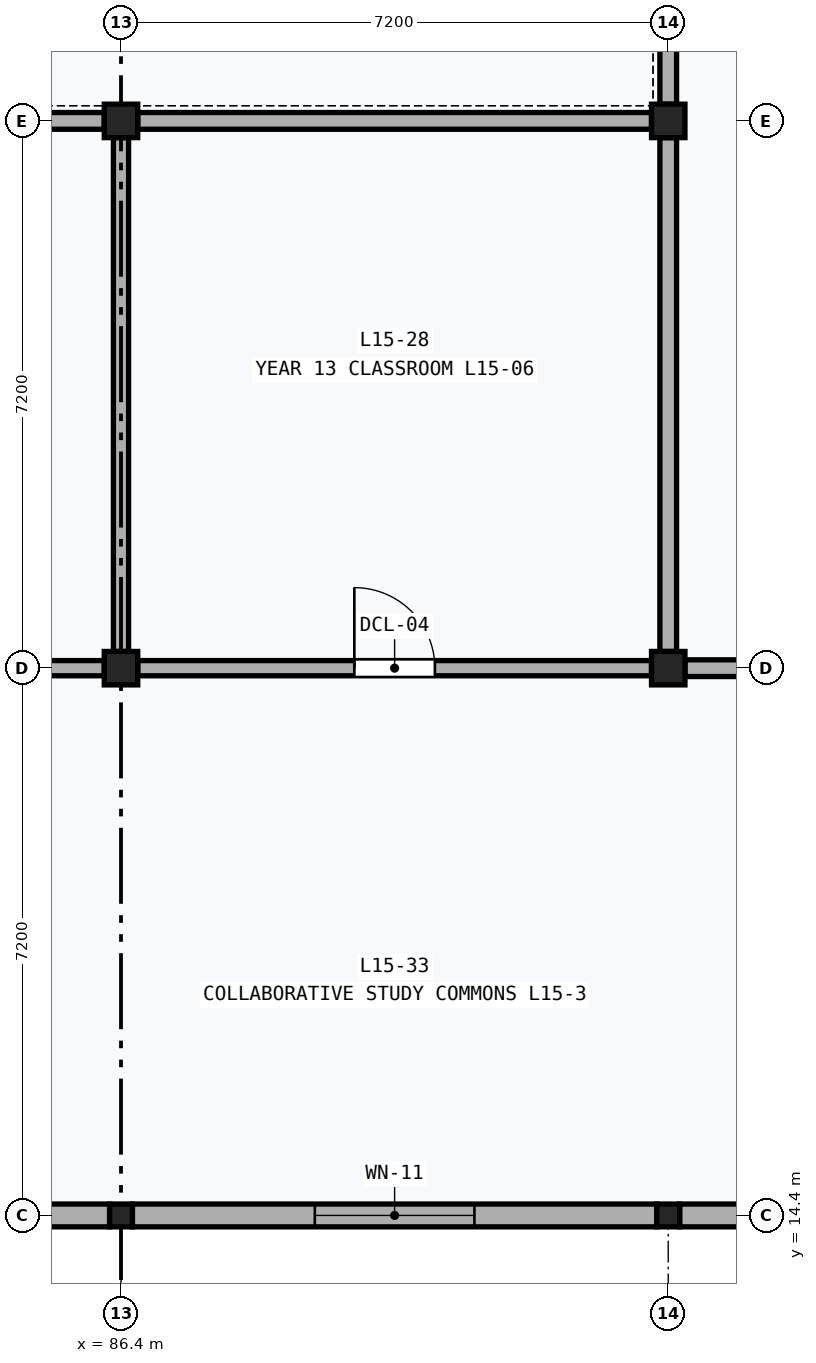
"""IFC4 building model, lengths in metres.
Left out: names, types, materials, properties, quantities, classifications, styles, units other than length and angle.
Written with IfcOpenShell. Run it as: python <this file> out.ifc"""

import sys

from ifc_helpers import new_model, si_unit, direction, frame, frame_2d, origin, origin_2d, place, context, subcontext, project, spatial, rectangle, extrude, element, fill, save


model = new_model("IFC4")
c1 = context("Model", 3, precision=1e-05, world=origin(), true_north=direction((0.0, 1.0)))
c2 = subcontext(c1, "Body", "Model", "MODEL_VIEW")
j1 = project(units=[si_unit("LENGTHUNIT", "METRE"), si_unit("PLANEANGLEUNIT", "RADIAN")], contexts=[c1])
p1 = place(None, origin())
s1 = spatial("IfcSite", under=j1, at=p1, CompositionType="ELEMENT")
p2 = place(p1, origin())
s2 = spatial("IfcBuilding", under=s1, at=p2, CompositionType="ELEMENT")
p3 = place(p2, frame((0.0, 0.0, 63.0)))
s3 = spatial("IfcBuildingStorey", under=s2, at=p3, CompositionType="ELEMENT", Elevation=63.0)
p4 = place(p3, frame((86.4, 14.4, 0.0), z_axis=(0.0, 0.0, 1.0), x_axis=(1.0, 0.0, 0.0)))
e1 = element("IfcColumn", 1, at=p4, inside=s3, PredefinedType="COLUMN", context=c2, shape_type="SweptSolid", body=[
    extrude(rectangle(XDim=0.3, YDim=0.3, at=origin_2d()), origin(), (0.0, 0.0, 1.0), 4.2),
])
for number, where, z_axis, x_axis in (
    (2, (86.4, 21.6, 0.0), (0.0, 0.0, 1.0), (1.0, 0.0, 0.0)),
    (3, (86.4, 28.8, 0.0), (0.0, 0.0, 1.0), (1.0, 0.0, 0.0)),
):
    element("IfcColumn", number, at=place(p3, frame(where, z_axis=z_axis, x_axis=x_axis)), inside=s3, PredefinedType="COLUMN", context=c2, shape_type="SweptSolid", body=[
        extrude(rectangle(XDim=0.44, YDim=0.44, at=origin_2d()), origin(), (0.0, 0.0, 1.0), 4.2),
    ])
p5 = place(p3, frame((93.6, 14.4, 0.0), z_axis=(0.0, 0.0, 1.0), x_axis=(1.0, 0.0, 0.0)))
e4 = element("IfcColumn", 4, at=p5, inside=s3, PredefinedType="COLUMN", context=c2, shape_type="SweptSolid", body=[
    extrude(rectangle(XDim=0.3, YDim=0.3, at=origin_2d()), origin(), (0.0, 0.0, 1.0), 4.2),
])
for number, where, z_axis, x_axis in (
    (5, (93.6, 21.6, 0.0), (0.0, 0.0, 1.0), (1.0, 0.0, 0.0)),
    (6, (93.6, 28.8, 0.0), (0.0, 0.0, 1.0), (1.0, 0.0, 0.0)),
):
    element("IfcColumn", number, at=place(p3, frame(where, z_axis=z_axis, x_axis=x_axis)), inside=s3, PredefinedType="COLUMN", context=c2, shape_type="SweptSolid", body=[
        extrude(rectangle(XDim=0.44, YDim=0.44, at=origin_2d()), origin(), (0.0, 0.0, 1.0), 4.2),
    ])
p6 = place(p3, frame((79.35, 14.4, 0.0), z_axis=(0.0, 0.0, 1.0), x_axis=(1.0, 0.0, 0.0)))
e7 = element("IfcWall", 7, at=p6, inside=s3, PredefinedType="SOLIDWALL", context=c2, shape_type="SweptSolid", body=[
    extrude(rectangle(XDim=6.9, YDim=0.3, at=frame_2d((3.45, 0.0))), origin(), (0.0, 0.0, 1.0), 3.39),
])
p7 = place(p6, frame((2.55, 0.0, 0.85)))
e8 = element("IfcOpeningElement", 8, at=p7, cuts=e7, PredefinedType="OPENING", context=c2, shape_type="SweptSolid", body=[
    extrude(rectangle(XDim=1.8, YDim=2.0, at=frame_2d((0.9, 1.0))), frame((0.0, 0.162, 0.0), z_axis=(0.0, -1.0, 0.0), x_axis=(1.0, 0.0, 0.0)), (0.0, 0.0, 1.0), 0.324),
])
p8 = place(p3, frame((86.55, 14.4, 0.0), z_axis=(0.0, 0.0, 1.0), x_axis=(1.0, 0.0, 0.0)))
e9 = element("IfcWall", 9, at=p8, inside=s3, PredefinedType="SOLIDWALL", context=c2, shape_type="SweptSolid", body=[
    extrude(rectangle(XDim=6.9, YDim=0.3, at=frame_2d((3.45, 0.0))), origin(), (0.0, 0.0, 1.0), 3.39),
])
p9 = place(p8, frame((2.4, 0.0, 0.85)))
e10 = element("IfcOpeningElement", 10, at=p9, cuts=e9, PredefinedType="OPENING", context=c2, shape_type="SweptSolid", body=[
    extrude(rectangle(XDim=2.1, YDim=2.0, at=frame_2d((1.05, 1.0))), frame((0.0, 0.162, 0.0), z_axis=(0.0, -1.0, 0.0), x_axis=(1.0, 0.0, 0.0)), (0.0, 0.0, 1.0), 0.324),
])
p10 = place(p3, frame((93.75, 14.4, 0.0), z_axis=(0.0, 0.0, 1.0), x_axis=(1.0, 0.0, 0.0)))
e11 = element("IfcWall", 11, at=p10, inside=s3, PredefinedType="SOLIDWALL", context=c2, shape_type="SweptSolid", body=[
    extrude(rectangle(XDim=6.87, YDim=0.3, at=frame_2d((3.435, 0.0))), origin(), (0.0, 0.0, 1.0), 3.39),
])
p11 = place(p10, frame((2.235, 0.0, 0.85)))
e12 = element("IfcOpeningElement", 12, at=p11, cuts=e11, PredefinedType="OPENING", context=c2, shape_type="SweptSolid", body=[
    extrude(rectangle(XDim=2.4, YDim=2.0, at=frame_2d((1.2, 1.0))), frame((0.0, 0.162, 0.0), z_axis=(0.0, -1.0, 0.0), x_axis=(1.0, 0.0, 0.0)), (0.0, 0.0, 1.0), 0.324),
])
p12 = place(p3, frame((79.42, 28.8, 0.0), z_axis=(0.0, 0.0, 1.0), x_axis=(1.0, 0.0, 0.0)))
e13 = element("IfcWall", 13, at=p12, inside=s3, PredefinedType="PARTITIONING", context=c2, shape_type="SweptSolid", body=[
    extrude(rectangle(XDim=6.76, YDim=0.22, at=frame_2d((3.38, 0.0))), origin(), (0.0, 0.0, 1.0), 3.31),
])
p13 = place(p3, frame((86.62, 28.8, 0.0), z_axis=(0.0, 0.0, 1.0), x_axis=(1.0, 0.0, 0.0)))
e14 = element("IfcWall", 14, at=p13, inside=s3, PredefinedType="PARTITIONING", context=c2, shape_type="SweptSolid", body=[
    extrude(rectangle(XDim=6.76, YDim=0.22, at=frame_2d((3.38, 0.0))), origin(), (0.0, 0.0, 1.0), 3.31),
])
p14 = place(p3, frame((93.6, 29.02, 0.0), z_axis=(0.0, 0.0, 1.0), x_axis=(0.0, 1.0, 0.0)))
e15 = element("IfcWall", 15, at=p14, inside=s3, PredefinedType="PARTITIONING", context=c2, shape_type="SweptSolid", body=[
    extrude(rectangle(XDim=6.76, YDim=0.22, at=frame_2d((3.38, 0.0))), origin(), (0.0, 0.0, 1.0), 3.31),
])
p15 = place(p3, frame((93.82, 21.6, 0.0), z_axis=(0.0, 0.0, 1.0), x_axis=(1.0, 0.0, 0.0)))
e16 = element("IfcWall", 16, at=p15, inside=s3, PredefinedType="PARTITIONING", context=c2, shape_type="SweptSolid", body=[
    extrude(rectangle(XDim=6.76, YDim=0.22, at=frame_2d((3.38, 0.0))), origin(), (0.0, 0.0, 1.0), 3.31),
])
p16 = place(p15, frame((2.78, 0.0, 0.0)))
e17 = element("IfcOpeningElement", 17, at=p16, cuts=e16, PredefinedType="OPENING", context=c2, shape_type="SweptSolid", body=[
    extrude(rectangle(XDim=1.2, YDim=2.24, at=frame_2d((0.6, 1.12))), frame((0.0, 0.122, 0.0), z_axis=(0.0, -1.0, 0.0), x_axis=(1.0, 0.0, 0.0)), (0.0, 0.0, 1.0), 0.244),
])
p17 = place(p3, frame((93.6, 21.82, 0.0), z_axis=(0.0, 0.0, 1.0), x_axis=(0.0, 1.0, 0.0)))
e18 = element("IfcWall", 18, at=p17, inside=s3, PredefinedType="PARTITIONING", context=c2, shape_type="SweptSolid", body=[
    extrude(rectangle(XDim=6.76, YDim=0.22, at=frame_2d((3.38, 0.0))), origin(), (0.0, 0.0, 1.0), 3.31),
])
p18 = place(p3, frame((79.42, 21.6, 0.0), z_axis=(0.0, 0.0, 1.0), x_axis=(1.0, 0.0, 0.0)))
e19 = element("IfcWall", 19, at=p18, inside=s3, PredefinedType="PARTITIONING", context=c2, shape_type="SweptSolid", body=[
    extrude(rectangle(XDim=6.76, YDim=0.2, at=frame_2d((3.38, 0.0))), origin(), (0.0, 0.0, 1.0), 3.31),
])
p19 = place(p18, frame((2.88, 0.0, 0.0)))
e20 = element("IfcOpeningElement", 20, at=p19, cuts=e19, PredefinedType="OPENING", context=c2, shape_type="SweptSolid", body=[
    extrude(rectangle(XDim=1.0, YDim=2.1, at=frame_2d((0.5, 1.05))), frame((0.0, 0.112, 0.0), z_axis=(0.0, -1.0, 0.0), x_axis=(1.0, 0.0, 0.0)), (0.0, 0.0, 1.0), 0.224),
])
p20 = place(p3, frame((86.4, 21.82, 0.0), z_axis=(0.0, 0.0, 1.0), x_axis=(0.0, 1.0, 0.0)))
e21 = element("IfcWall", 21, at=p20, inside=s3, PredefinedType="PARTITIONING", context=c2, shape_type="SweptSolid", body=[
    extrude(rectangle(XDim=6.76, YDim=0.2, at=frame_2d((3.38, 0.0))), origin(), (0.0, 0.0, 1.0), 3.31),
])
p21 = place(p3, frame((86.62, 21.6, 0.0), z_axis=(0.0, 0.0, 1.0), x_axis=(1.0, 0.0, 0.0)))
e22 = element("IfcWall", 22, at=p21, inside=s3, PredefinedType="PARTITIONING", context=c2, shape_type="SweptSolid", body=[
    extrude(rectangle(XDim=6.76, YDim=0.2, at=frame_2d((3.38, 0.0))), origin(), (0.0, 0.0, 1.0), 3.31),
])
p22 = place(p21, frame((2.85, 0.0, 0.0)))
e23 = element("IfcOpeningElement", 23, at=p22, cuts=e22, PredefinedType="OPENING", context=c2, shape_type="SweptSolid", body=[
    extrude(rectangle(XDim=1.06, YDim=2.16, at=frame_2d((0.53, 1.08))), frame((0.0, 0.112, 0.0), z_axis=(0.0, -1.0, 0.0), x_axis=(1.0, 0.0, 0.0)), (0.0, 0.0, 1.0), 0.224),
])
p23 = place(p9, origin())
e24 = element("IfcWindow", 24, at=p23, inside=s3, PartitioningType="SINGLE_PANEL", PredefinedType="WINDOW", context=c2, shape_type="SweptSolid", body=[
    extrude(rectangle(XDim=2.1, YDim=2.0, at=frame_2d((1.05, 1.0))), frame((0.0, 0.03, 0.0), z_axis=(0.0, -1.0, 0.0), x_axis=(1.0, 0.0, 0.0)), (0.0, 0.0, 1.0), 0.06),
])
fill(e10, e24)
p24 = place(p22, origin())
e25 = element("IfcDoor", 25, at=p24, inside=s3, OperationType="SINGLE_SWING_LEFT", PredefinedType="DOOR", context=c2, shape_type="SweptSolid", body=[
    extrude(rectangle(XDim=1.06, YDim=2.16, at=frame_2d((0.53, 1.08))), frame((0.0, 0.025, 0.0), z_axis=(0.0, -1.0, 0.0), x_axis=(1.0, 0.0, 0.0)), (0.0, 0.0, 1.0), 0.05),
])
fill(e23, e25)
save(model, sys.argv[1])
